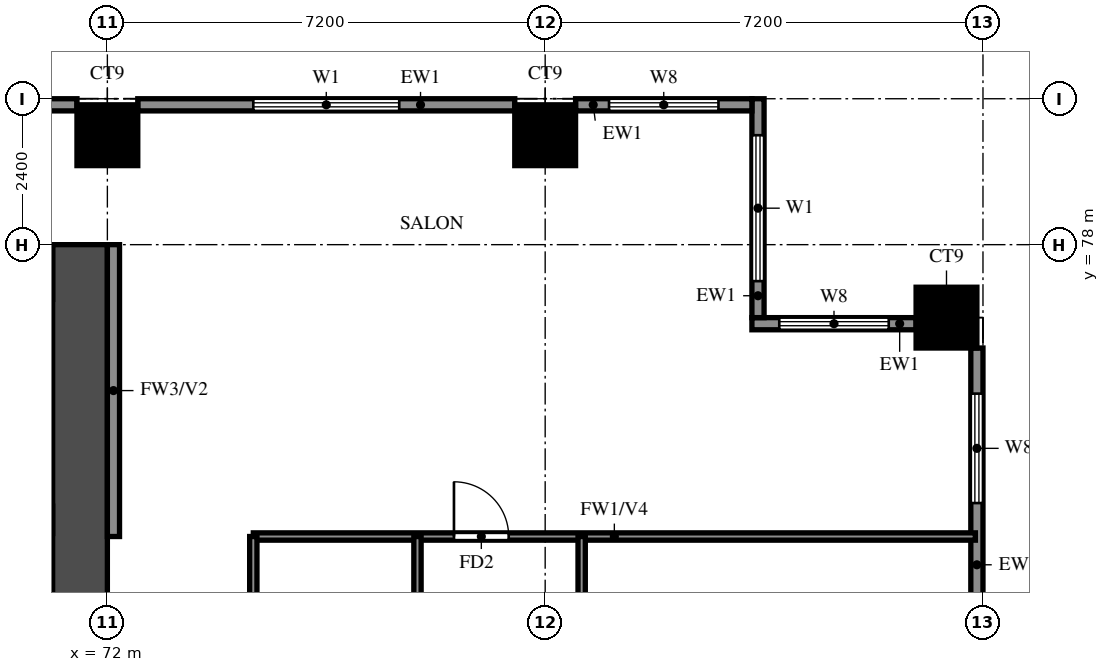
"""IFC4 building model, lengths in metres.
Left out: names, types, materials, properties, quantities, classifications, styles, units other than length and angle.
Written with IfcOpenShell. Run it as: python <this file> out.ifc"""

import sys

from ifc_helpers import new_model, si_unit, direction, frame, frame_2d, origin, origin_2d, place, context, subcontext, project, spatial, rectangle, extrude, source, transform, mapped, element, fill, save


model = new_model("IFC4")
c1 = context("Model", 3, precision=1e-05, world=origin(), true_north=direction((0.0, 1.0)))
c2 = subcontext(c1, "Body", "Model", "MODEL_VIEW")
j1 = project(units=[si_unit("LENGTHUNIT", "METRE"), si_unit("PLANEANGLEUNIT", "RADIAN")], contexts=[c1])
p1 = place(None, origin())
s1 = spatial("IfcSite", under=j1, at=p1, CompositionType="ELEMENT")
p2 = place(p1, origin())
s2 = spatial("IfcBuilding", under=s1, at=p2, CompositionType="ELEMENT")
p3 = place(p2, frame((0.0, 0.0, 86.5)))
s3 = spatial("IfcBuildingStorey", under=s2, at=p3, CompositionType="ELEMENT", Elevation=86.5)
m1 = source(origin(), c2, "Body", "SweptSolid", [
    extrude(rectangle(XDim=1.0, YDim=1.0, at=origin_2d()), origin(), (0.0, 0.0, 1.0), 3.18),
])
for number, where, z_axis, x_axis in (
    (1, (85.8, 76.8, 0.0), (0.0, 0.0, 1.0), (1.0, 0.0, 0.0)),
    (2, (72.0, 79.8, 0.0), (0.0, 0.0, 1.0), (1.0, 0.0, 0.0)),
    (3, (79.2, 79.8, 0.0), (0.0, 0.0, 1.0), (1.0, 0.0, 0.0)),
):
    element("IfcColumn", number, at=place(p3, frame(where, z_axis=z_axis, x_axis=x_axis)), inside=s3, PredefinedType="COLUMN", context=c2, shape_type="MappedRepresentation", body=[
        mapped(m1, transform((0.0, 0.0, 0.0))),
    ])
p4 = place(p3, frame((71.55, 66.0, 0.0), z_axis=(0.0, 0.0, 1.0), x_axis=(0.0, 1.0, 0.0)))
e4 = element("IfcWall", 4, at=p4, inside=s3, PredefinedType="SHEAR", context=c2, shape_type="SweptSolid", body=[
    extrude(rectangle(XDim=12.0, YDim=0.9, at=frame_2d((6.0, 0.0))), origin(), (0.0, 0.0, 1.0), 3.18),
])
p5 = place(p3, frame((29.7, 77.55, 0.0), z_axis=(0.0, 0.0, 1.0), x_axis=(1.0, 0.0, 0.0)))
e5 = element("IfcWall", 5, at=p5, inside=s3, PredefinedType="SHEAR", context=c2, shape_type="SweptSolid", body=[
    extrude(rectangle(XDim=41.4, YDim=0.9, at=frame_2d((20.7, 0.0))), origin(), (0.0, 0.0, 1.0), 3.18),
])
p6 = place(p3, frame((86.3, 70.1, 0.0), z_axis=(0.0, 0.0, 1.0), x_axis=(0.0, 1.0, 0.0)))
e6 = element("IfcWall", 6, at=p6, inside=s3, PredefinedType="SOLIDWALL", context=c2, shape_type="SweptSolid", body=[
    extrude(rectangle(XDim=6.2, YDim=0.2, at=frame_2d((3.1, 0.0))), origin(), (0.0, 0.0, 1.0), 3.18),
])
p7 = place(p6, frame((1.2, 0.0, 1.5)))
e7 = element("IfcOpeningElement", 7, at=p7, cuts=e6, PredefinedType="OPENING", context=c2, shape_type="SweptSolid", body=[
    extrude(rectangle(XDim=0.9, YDim=0.9, at=frame_2d((0.45, 0.45))), frame((0.0, 0.11, 0.0), z_axis=(0.0, -1.0, 0.0), x_axis=(1.0, 0.0, 0.0)), (0.0, 0.0, 1.0), 0.22),
])
p8 = place(p6, frame((3.65, 0.0, 0.6)))
e8 = element("IfcOpeningElement", 8, at=p8, cuts=e6, PredefinedType="OPENING", context=c2, shape_type="SweptSolid", body=[
    extrude(rectangle(XDim=1.8, YDim=2.4, at=frame_2d((0.9, 1.2))), frame((0.0, 0.11, 0.0), z_axis=(0.0, -1.0, 0.0), x_axis=(1.0, 0.0, 0.0)), (0.0, 0.0, 1.0), 0.22),
])
p9 = place(p3, frame((85.3, 76.7, 0.0), z_axis=(0.0, 0.0, 1.0), x_axis=(-1.0, 0.0, 0.0)))
e9 = element("IfcWall", 9, at=p9, inside=s3, PredefinedType="SOLIDWALL", context=c2, shape_type="SweptSolid", body=[
    extrude(rectangle(XDim=2.7, YDim=0.2, at=frame_2d((1.35, 0.0))), origin(), (0.0, 0.0, 1.0), 3.18),
])
p10 = place(p9, frame((0.45, 0.0, 0.6)))
e10 = element("IfcOpeningElement", 10, at=p10, cuts=e9, PredefinedType="OPENING", context=c2, shape_type="SweptSolid", body=[
    extrude(rectangle(XDim=1.8, YDim=2.4, at=frame_2d((0.9, 1.2))), frame((0.0, 0.11, 0.0), z_axis=(0.0, -1.0, 0.0), x_axis=(1.0, 0.0, 0.0)), (0.0, 0.0, 1.0), 0.22),
])
p11 = place(p3, frame((82.7, 76.8, 0.0), z_axis=(0.0, 0.0, 1.0), x_axis=(0.0, 1.0, 0.0)))
e11 = element("IfcWall", 11, at=p11, inside=s3, PredefinedType="SOLIDWALL", context=c2, shape_type="SweptSolid", body=[
    extrude(rectangle(XDim=3.6, YDim=0.2, at=frame_2d((1.8, 0.0))), origin(), (0.0, 0.0, 1.0), 3.18),
])
p12 = place(p11, frame((0.6, 0.0, 0.6)))
e12 = element("IfcOpeningElement", 12, at=p12, cuts=e11, PredefinedType="OPENING", context=c2, shape_type="SweptSolid", body=[
    extrude(rectangle(XDim=2.4, YDim=2.4, at=frame_2d((1.2, 1.2))), frame((0.0, 0.11, 0.0), z_axis=(0.0, -1.0, 0.0), x_axis=(1.0, 0.0, 0.0)), (0.0, 0.0, 1.0), 0.22),
])
p13 = place(p3, frame((82.6, 80.3, 0.0), z_axis=(0.0, 0.0, 1.0), x_axis=(-1.0, 0.0, 0.0)))
e13 = element("IfcWall", 13, at=p13, inside=s3, PredefinedType="SOLIDWALL", context=c2, shape_type="SweptSolid", body=[
    extrude(rectangle(XDim=2.9, YDim=0.2, at=frame_2d((1.45, 0.0))), origin(), (0.0, 0.0, 1.0), 3.18),
])
p14 = place(p13, frame((0.55, 0.0, 0.6)))
e14 = element("IfcOpeningElement", 14, at=p14, cuts=e13, PredefinedType="OPENING", context=c2, shape_type="SweptSolid", body=[
    extrude(rectangle(XDim=1.8, YDim=2.4, at=frame_2d((0.9, 1.2))), frame((0.0, 0.11, 0.0), z_axis=(0.0, -1.0, 0.0), x_axis=(1.0, 0.0, 0.0)), (0.0, 0.0, 1.0), 0.22),
])
p15 = place(p3, frame((78.7, 80.3, 0.0), z_axis=(0.0, 0.0, 1.0), x_axis=(-1.0, 0.0, 0.0)))
e15 = element("IfcWall", 15, at=p15, inside=s3, PredefinedType="SOLIDWALL", context=c2, shape_type="SweptSolid", body=[
    extrude(rectangle(XDim=6.2, YDim=0.2, at=frame_2d((3.1, 0.0))), origin(), (0.0, 0.0, 1.0), 3.18),
])
p16 = place(p15, frame((1.9, 0.0, 0.6)))
e16 = element("IfcOpeningElement", 16, at=p16, cuts=e15, PredefinedType="OPENING", context=c2, shape_type="SweptSolid", body=[
    extrude(rectangle(XDim=2.4, YDim=2.4, at=frame_2d((1.2, 1.2))), frame((0.0, 0.11, 0.0), z_axis=(0.0, -1.0, 0.0), x_axis=(1.0, 0.0, 0.0)), (0.0, 0.0, 1.0), 0.22),
])
p17 = place(p3, frame((71.5, 80.3, 0.0), z_axis=(0.0, 0.0, 1.0), x_axis=(-1.0, 0.0, 0.0)))
e17 = element("IfcWall", 17, at=p17, inside=s3, PredefinedType="SOLIDWALL", context=c2, shape_type="SweptSolid", body=[
    extrude(rectangle(XDim=6.2, YDim=0.2, at=frame_2d((3.1, 0.0))), origin(), (0.0, 0.0, 1.0), 3.18),
])
p18 = place(p3, frame((72.1, 73.2, 0.0), z_axis=(0.0, 0.0, 1.0), x_axis=(0.0, 1.0, 0.0)))
e18 = element("IfcWall", 18, at=p18, inside=s3, PredefinedType="SOLIDWALL", context=c2, shape_type="SweptSolid", body=[
    extrude(rectangle(XDim=4.8, YDim=0.2, at=frame_2d((2.4, 0.0))), origin(), (0.0, 0.0, 1.0), 3.18),
])
p19 = place(p3, frame((74.4, 73.2, 0.0), z_axis=(0.0, 0.0, 1.0), x_axis=(1.0, 0.0, 0.0)))
e19 = element("IfcWall", 19, at=p19, inside=s3, PredefinedType="PARTITIONING", context=c2, shape_type="SweptSolid", body=[
    extrude(rectangle(XDim=11.875, YDim=0.12, at=frame_2d((5.938, 0.0))), origin(), (0.0, 0.0, 1.0), 2.28),
])
p20 = place(p19, frame((3.3, 0.0, 0.0)))
e20 = element("IfcOpeningElement", 20, at=p20, cuts=e19, PredefinedType="OPENING", context=c2, shape_type="SweptSolid", body=[
    extrude(rectangle(XDim=0.9, YDim=2.1, at=frame_2d((0.45, 1.05))), frame((0.0, 0.07, 0.0), z_axis=(0.0, -1.0, 0.0), x_axis=(1.0, 0.0, 0.0)), (0.0, 0.0, 1.0), 0.14),
])
p21 = place(p3, frame((74.4, 68.6, 0.0), z_axis=(0.0, 0.0, 1.0), x_axis=(0.0, 1.0, 0.0)))
e21 = element("IfcWall", 21, at=p21, inside=s3, PredefinedType="PARTITIONING", context=c2, shape_type="SweptSolid", body=[
    extrude(rectangle(XDim=4.6, YDim=0.12, at=frame_2d((2.3, 0.0))), origin(), (0.0, 0.0, 1.0), 3.18),
])
p22 = place(p3, frame((77.1, 61.2, 0.0), z_axis=(0.0, 0.0, 1.0), x_axis=(0.0, 1.0, 0.0)))
e22 = element("IfcWall", 22, at=p22, inside=s3, PredefinedType="PARTITIONING", context=c2, shape_type="SweptSolid", body=[
    extrude(rectangle(XDim=12.0, YDim=0.12, at=frame_2d((6.0, 0.0))), origin(), (0.0, 0.0, 1.0), 3.18),
])
p23 = place(p22, frame((4.55, 0.0, 0.0)))
e23 = element("IfcOpeningElement", 23, at=p23, cuts=e22, PredefinedType="OPENING", context=c2, shape_type="SweptSolid", body=[
    extrude(rectangle(XDim=0.9, YDim=2.1, at=frame_2d((0.45, 1.05))), frame((0.0, 0.07, 0.0), z_axis=(0.0, -1.0, 0.0), x_axis=(1.0, 0.0, 0.0)), (0.0, 0.0, 1.0), 0.14),
])
p24 = place(p22, frame((9.3, 0.0, 0.0)))
e24 = element("IfcOpeningElement", 24, at=p24, cuts=e22, PredefinedType="OPENING", context=c2, shape_type="SweptSolid", body=[
    extrude(rectangle(XDim=0.8, YDim=2.1, at=frame_2d((0.4, 1.05))), frame((0.0, 0.07, 0.0), z_axis=(0.0, -1.0, 0.0), x_axis=(1.0, 0.0, 0.0)), (0.0, 0.0, 1.0), 0.14),
])
p25 = place(p3, frame((79.8, 69.6, 0.0), z_axis=(0.0, 0.0, 1.0), x_axis=(0.0, 1.0, 0.0)))
e25 = element("IfcWall", 25, at=p25, inside=s3, PredefinedType="PARTITIONING", context=c2, shape_type="SweptSolid", body=[
    extrude(rectangle(XDim=3.6, YDim=0.12, at=frame_2d((1.8, 0.0))), origin(), (0.0, 0.0, 1.0), 3.18),
])
p26 = place(p8, origin())
e26 = element("IfcWindow", 26, at=p26, inside=s3, PartitioningType="DOUBLE_PANEL_VERTICAL", PredefinedType="WINDOW", context=c2, shape_type="SweptSolid", body=[
    extrude(rectangle(XDim=1.8, YDim=2.4, at=frame_2d((0.9, 1.2))), frame((0.0, 0.03, 0.0), z_axis=(0.0, -1.0, 0.0), x_axis=(1.0, 0.0, 0.0)), (0.0, 0.0, 1.0), 0.06),
])
fill(e8, e26)
p27 = place(p10, origin())
e27 = element("IfcWindow", 27, at=p27, inside=s3, PartitioningType="DOUBLE_PANEL_VERTICAL", PredefinedType="WINDOW", context=c2, shape_type="SweptSolid", body=[
    extrude(rectangle(XDim=1.8, YDim=2.4, at=frame_2d((0.9, 1.2))), frame((0.0, 0.03, 0.0), z_axis=(0.0, -1.0, 0.0), x_axis=(1.0, 0.0, 0.0)), (0.0, 0.0, 1.0), 0.06),
])
fill(e10, e27)
p28 = place(p12, origin())
e28 = element("IfcWindow", 28, at=p28, inside=s3, PartitioningType="DOUBLE_PANEL_VERTICAL", PredefinedType="WINDOW", context=c2, shape_type="SweptSolid", body=[
    extrude(rectangle(XDim=2.4, YDim=2.4, at=frame_2d((1.2, 1.2))), frame((0.0, 0.03, 0.0), z_axis=(0.0, -1.0, 0.0), x_axis=(1.0, 0.0, 0.0)), (0.0, 0.0, 1.0), 0.06),
])
fill(e12, e28)
p29 = place(p14, origin())
e29 = element("IfcWindow", 29, at=p29, inside=s3, PartitioningType="DOUBLE_PANEL_VERTICAL", PredefinedType="WINDOW", context=c2, shape_type="SweptSolid", body=[
    extrude(rectangle(XDim=1.8, YDim=2.4, at=frame_2d((0.9, 1.2))), frame((0.0, 0.03, 0.0), z_axis=(0.0, -1.0, 0.0), x_axis=(1.0, 0.0, 0.0)), (0.0, 0.0, 1.0), 0.06),
])
fill(e14, e29)
p30 = place(p16, origin())
e30 = element("IfcWindow", 30, at=p30, inside=s3, PartitioningType="DOUBLE_PANEL_VERTICAL", PredefinedType="WINDOW", context=c2, shape_type="SweptSolid", body=[
    extrude(rectangle(XDim=2.4, YDim=2.4, at=frame_2d((1.2, 1.2))), frame((0.0, 0.03, 0.0), z_axis=(0.0, -1.0, 0.0), x_axis=(1.0, 0.0, 0.0)), (0.0, 0.0, 1.0), 0.06),
])
fill(e16, e30)
p31 = place(p20, origin())
e31 = element("IfcDoor", 31, at=p31, inside=s3, OperationType="SINGLE_SWING_LEFT", PredefinedType="DOOR", context=c2, shape_type="SweptSolid", body=[
    extrude(rectangle(XDim=0.9, YDim=2.1, at=frame_2d((0.45, 1.05))), frame((0.0, 0.025, 0.0), z_axis=(0.0, -1.0, 0.0), x_axis=(1.0, 0.0, 0.0)), (0.0, 0.0, 1.0), 0.05),
])
fill(e20, e31)
save(model, sys.argv[1])
